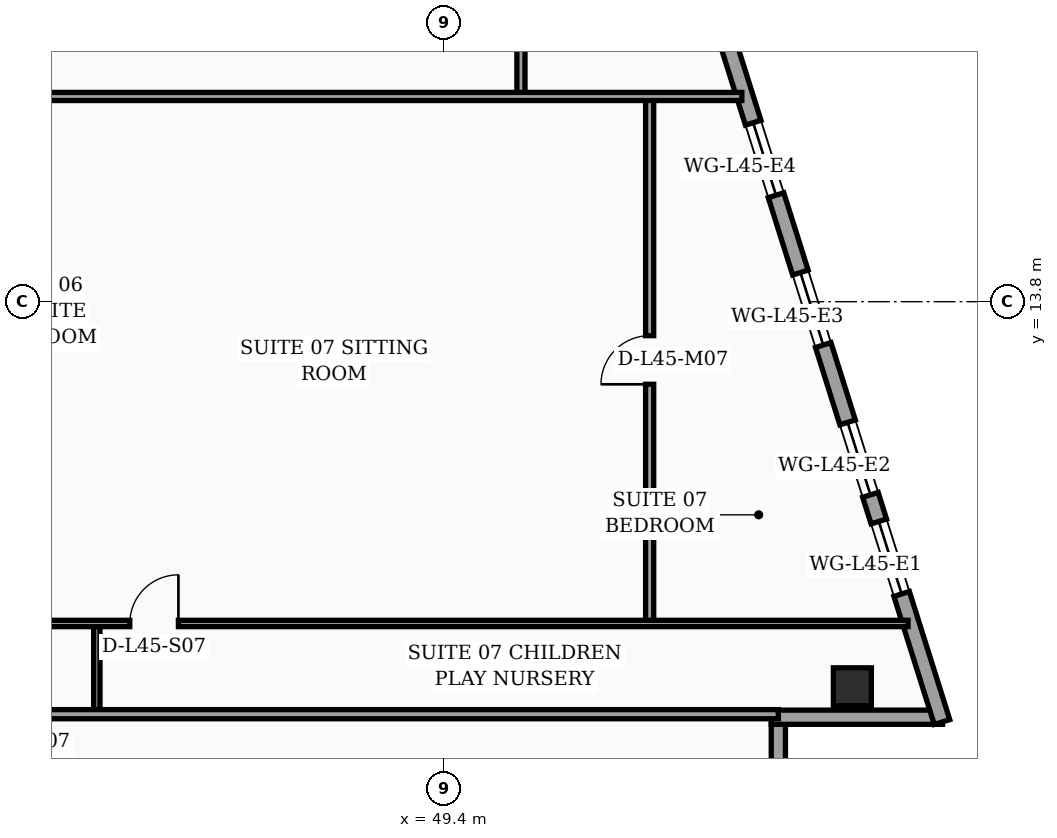
"""IFC4 building model, lengths in metres.
Left out: names, types, materials, properties, quantities, classifications, styles, units other than length and angle.
Written with IfcOpenShell. Run it as: python <this file> out.ifc"""

import sys

from ifc_helpers import new_model, si_unit, direction, frame, frame_2d, origin, origin_2d, place, context, subcontext, project, spatial, rectangle, hollow_rectangle, extrude, element, fill, save


model = new_model("IFC4")
c1 = context("Model", 3, precision=1e-05, world=origin(), true_north=direction((0.0, 1.0)))
c2 = subcontext(c1, "Body", "Model", "MODEL_VIEW")
j1 = project(units=[si_unit("LENGTHUNIT", "METRE"), si_unit("PLANEANGLEUNIT", "RADIAN")], contexts=[c1])
p1 = place(None, origin())
s1 = spatial("IfcSite", under=j1, at=p1, CompositionType="ELEMENT")
p2 = place(p1, origin())
s2 = spatial("IfcBuilding", under=s1, at=p2, CompositionType="ELEMENT")
p3 = place(p2, frame((0.0, 0.0, 182.7)))
s3 = spatial("IfcBuildingStorey", under=s2, at=p3, CompositionType="ELEMENT", Elevation=182.7)
p4 = place(p3, frame((57.461, 6.2, 0.0), z_axis=(0.0, 0.0, 1.0), x_axis=(1.0, 0.0, 0.0)))
e1 = element("IfcColumn", 1, at=p4, inside=s3, PredefinedType="COLUMN", context=c2, shape_type="SweptSolid", body=[
    extrude(hollow_rectangle(XDim=0.75, YDim=0.75, WallThickness=0.032, at=origin_2d()), origin(), (0.0, 0.0, 1.0), 3.52),
])
p5 = place(p3, frame((56.0, 2.52, 0.0), z_axis=(0.0, 0.0, 1.0), x_axis=(0.0, 1.0, 0.0)))
e2 = element("IfcWall", 2, at=p5, inside=s3, PredefinedType="SOLIDWALL", context=c2, shape_type="SweptSolid", body=[
    extrude(rectangle(XDim=2.94, YDim=0.28, at=frame_2d((1.47, 0.0))), origin(), (0.0, 0.0, 1.0), 3.02),
])
p6 = place(p3, frame((55.86, 5.6, 0.0), z_axis=(0.0, 0.0, 1.0), x_axis=(1.0, 0.0, 0.0)))
e3 = element("IfcWall", 3, at=p6, inside=s3, PredefinedType="SOLIDWALL", context=c2, shape_type="SweptSolid", body=[
    extrude(rectangle(XDim=3.38, YDim=0.28, at=frame_2d((1.69, 0.0))), origin(), (0.0, 0.0, 1.0), 3.02),
])
p7 = place(p3, frame((59.23, 5.505, 0.0), z_axis=(0.0, 0.0, 1.0), x_axis=(-0.300509063924, 0.953778958931, 0.0)))
e4 = element("IfcWall", 4, at=p7, inside=s3, PredefinedType="SOLIDWALL", context=c2, shape_type="SweptSolid", body=[
    extrude(rectangle(XDim=30.814, YDim=0.32, at=frame_2d((15.407, 0.0))), origin(), (0.0, 0.0, 1.0), 3.52),
])
p8 = place(p7, frame((18.796, 0.0, 0.0)))
e5 = element("IfcOpeningElement", 5, at=p8, cuts=e4, PredefinedType="OPENING", context=c2, shape_type="SweptSolid", body=[
    extrude(rectangle(XDim=1.4, YDim=2.25, at=frame_2d((0.7, 1.125))), frame((0.0, 0.17, 0.0), z_axis=(0.0, -1.0, 0.0), x_axis=(1.0, 0.0, 0.0)), (0.0, 0.0, 1.0), 0.34),
])
p9 = place(p7, frame((2.65, 0.0, 0.75)))
e6 = element("IfcOpeningElement", 6, at=p9, cuts=e4, PredefinedType="OPENING", context=c2, shape_type="SweptSolid", body=[
    extrude(rectangle(XDim=1.5, YDim=1.6, at=frame_2d((0.75, 0.8))), frame((0.0, 0.17, 0.0), z_axis=(0.0, -1.0, 0.0), x_axis=(1.0, 0.0, 0.0)), (0.0, 0.0, 1.0), 0.34),
])
p10 = place(p7, frame((4.7, 0.0, 0.75)))
e7 = element("IfcOpeningElement", 7, at=p10, cuts=e4, PredefinedType="OPENING", context=c2, shape_type="SweptSolid", body=[
    extrude(rectangle(XDim=1.5, YDim=1.6, at=frame_2d((0.75, 0.8))), frame((0.0, 0.17, 0.0), z_axis=(0.0, -1.0, 0.0), x_axis=(1.0, 0.0, 0.0)), (0.0, 0.0, 1.0), 0.34),
])
p11 = place(p7, frame((7.8, 0.0, 0.75)))
e8 = element("IfcOpeningElement", 8, at=p11, cuts=e4, PredefinedType="OPENING", context=c2, shape_type="SweptSolid", body=[
    extrude(rectangle(XDim=1.5, YDim=1.6, at=frame_2d((0.75, 0.8))), frame((0.0, 0.17, 0.0), z_axis=(0.0, -1.0, 0.0), x_axis=(1.0, 0.0, 0.0)), (0.0, 0.0, 1.0), 0.34),
])
p12 = place(p7, frame((10.9, 0.0, 0.75)))
e9 = element("IfcOpeningElement", 9, at=p12, cuts=e4, PredefinedType="OPENING", context=c2, shape_type="SweptSolid", body=[
    extrude(rectangle(XDim=1.5, YDim=1.6, at=frame_2d((0.75, 0.8))), frame((0.0, 0.17, 0.0), z_axis=(0.0, -1.0, 0.0), x_axis=(1.0, 0.0, 0.0)), (0.0, 0.0, 1.0), 0.34),
])
p13 = place(p7, frame((14.0, 0.0, 0.75)))
e10 = element("IfcOpeningElement", 10, at=p13, cuts=e4, PredefinedType="OPENING", context=c2, shape_type="SweptSolid", body=[
    extrude(rectangle(XDim=1.5, YDim=1.6, at=frame_2d((0.75, 0.8))), frame((0.0, 0.17, 0.0), z_axis=(0.0, -1.0, 0.0), x_axis=(1.0, 0.0, 0.0)), (0.0, 0.0, 1.0), 0.34),
])
p14 = place(p7, frame((16.55, 0.0, 0.75)))
e11 = element("IfcOpeningElement", 11, at=p14, cuts=e4, PredefinedType="OPENING", context=c2, shape_type="SweptSolid", body=[
    extrude(rectangle(XDim=1.5, YDim=1.6, at=frame_2d((0.75, 0.8))), frame((0.0, 0.17, 0.0), z_axis=(0.0, -1.0, 0.0), x_axis=(1.0, 0.0, 0.0)), (0.0, 0.0, 1.0), 0.34),
])
p15 = place(p7, frame((23.3, 0.0, 0.75)))
e12 = element("IfcOpeningElement", 12, at=p15, cuts=e4, PredefinedType="OPENING", context=c2, shape_type="SweptSolid", body=[
    extrude(rectangle(XDim=1.5, YDim=1.6, at=frame_2d((0.75, 0.8))), frame((0.0, 0.17, 0.0), z_axis=(0.0, -1.0, 0.0), x_axis=(1.0, 0.0, 0.0)), (0.0, 0.0, 1.0), 0.34),
])
p16 = place(p7, frame((27.45, 0.0, 0.75)))
e13 = element("IfcOpeningElement", 13, at=p16, cuts=e4, PredefinedType="OPENING", context=c2, shape_type="SweptSolid", body=[
    extrude(rectangle(XDim=1.5, YDim=1.6, at=frame_2d((0.75, 0.8))), frame((0.0, 0.17, 0.0), z_axis=(0.0, -1.0, 0.0), x_axis=(1.0, 0.0, 0.0)), (0.0, 0.0, 1.0), 0.34),
])
p17 = place(p3, frame((42.55, 5.66, 0.0), z_axis=(0.0, 0.0, 1.0), x_axis=(0.0, 1.0, 0.0)))
e14 = element("IfcWall", 14, at=p17, inside=s3, PredefinedType="PARTITIONING", context=c2, shape_type="SweptSolid", body=[
    extrude(rectangle(XDim=1.79, YDim=0.125, at=frame_2d((0.895, 0.0))), origin(), (0.0, 0.0, 1.0), 3.52),
])
p18 = place(p3, frame((53.46, 7.45, 0.0), z_axis=(0.0, 0.0, 1.0), x_axis=(0.0, 1.0, 0.0)))
e15 = element("IfcWall", 15, at=p18, inside=s3, PredefinedType="PARTITIONING", context=c2, shape_type="SweptSolid", body=[
    extrude(rectangle(XDim=10.4, YDim=0.16, at=frame_2d((5.2, 0.0))), origin(), (0.0, 0.0, 1.0), 3.02),
])
p19 = place(p18, frame((4.72, 0.0, 0.0)))
e16 = element("IfcOpeningElement", 16, at=p19, cuts=e15, PredefinedType="OPENING", context=c2, shape_type="SweptSolid", body=[
    extrude(rectangle(XDim=0.96, YDim=2.2, at=frame_2d((0.48, 1.1))), frame((0.0, 0.09, 0.0), z_axis=(0.0, -1.0, 0.0), x_axis=(1.0, 0.0, 0.0)), (0.0, 0.0, 1.0), 0.18),
])
p20 = place(p3, frame((39.6, 7.45, 0.0), z_axis=(0.0, 0.0, 1.0), x_axis=(1.0, 0.0, 0.0)))
e17 = element("IfcWall", 17, at=p20, inside=s3, PredefinedType="PARTITIONING", context=c2, shape_type="SweptSolid", body=[
    extrude(rectangle(XDim=18.96, YDim=0.125, at=frame_2d((9.48, 0.0))), origin(), (0.0, 0.0, 1.0), 2.92),
])
p21 = place(p20, frame((0.5, 0.0, 0.0)))
e18 = element("IfcOpeningElement", 18, at=p21, cuts=e17, PredefinedType="OPENING", context=c2, shape_type="SweptSolid", body=[
    extrude(rectangle(XDim=0.9, YDim=2.15, at=frame_2d((0.45, 1.075))), frame((0.0, 0.073, 0.0), z_axis=(0.0, -1.0, 0.0), x_axis=(1.0, 0.0, 0.0)), (0.0, 0.0, 1.0), 0.145),
])
p22 = place(p20, frame((3.6, 0.0, 0.0)))
e19 = element("IfcOpeningElement", 19, at=p22, cuts=e17, PredefinedType="OPENING", context=c2, shape_type="SweptSolid", body=[
    extrude(rectangle(XDim=0.96, YDim=2.2, at=frame_2d((0.48, 1.1))), frame((0.0, 0.073, 0.0), z_axis=(0.0, -1.0, 0.0), x_axis=(1.0, 0.0, 0.0)), (0.0, 0.0, 1.0), 0.145),
])
p23 = place(p3, frame((39.6, 5.66, 0.0), z_axis=(0.0, 0.0, 1.0), x_axis=(1.0, 0.0, 0.0)))
e20 = element("IfcWall", 20, at=p23, inside=s3, PredefinedType="PARTITIONING", context=c2, shape_type="SweptSolid", body=[
    extrude(rectangle(XDim=16.4, YDim=0.18, at=frame_2d((8.2, 0.0))), origin(), (0.0, 0.0, 1.0), 2.92),
])
p24 = place(p3, frame((50.92, 17.85, 0.0), z_axis=(0.0, 0.0, 1.0), x_axis=(0.0, 1.0, 0.0)))
e21 = element("IfcWall", 21, at=p24, inside=s3, PredefinedType="PARTITIONING", context=c2, shape_type="SweptSolid", body=[
    extrude(rectangle(XDim=5.74, YDim=0.16, at=frame_2d((2.87, 0.0))), origin(), (0.0, 0.0, 1.0), 2.92),
])
p25 = place(p24, frame((2.39, 0.0, 0.0)))
e22 = element("IfcOpeningElement", 22, at=p25, cuts=e21, PredefinedType="OPENING", context=c2, shape_type="SweptSolid", body=[
    extrude(rectangle(XDim=0.96, YDim=2.2, at=frame_2d((0.48, 1.1))), frame((0.0, 0.09, 0.0), z_axis=(0.0, -1.0, 0.0), x_axis=(1.0, 0.0, 0.0)), (0.0, 0.0, 1.0), 0.18),
])
p26 = place(p3, frame((39.6, 17.85, 0.0), z_axis=(0.0, 0.0, 1.0), x_axis=(1.0, 0.0, 0.0)))
e23 = element("IfcWall", 23, at=p26, inside=s3, PredefinedType="PARTITIONING", context=c2, shape_type="SweptSolid", body=[
    extrude(rectangle(XDim=15.68, YDim=0.16, at=frame_2d((7.84, 0.0))), origin(), (0.0, 0.0, 1.0), 2.92),
])
p27 = place(p9, origin())
e24 = element("IfcWindow", 24, at=p27, inside=s3, PartitioningType="SINGLE_PANEL", PredefinedType="WINDOW", context=c2, shape_type="SweptSolid", body=[
    extrude(rectangle(XDim=1.5, YDim=1.6, at=frame_2d((0.75, 0.8))), frame((0.0, 0.03, 0.0), z_axis=(0.0, -1.0, 0.0), x_axis=(1.0, 0.0, 0.0)), (0.0, 0.0, 1.0), 0.06),
])
fill(e6, e24)
p28 = place(p10, origin())
e25 = element("IfcWindow", 25, at=p28, inside=s3, PartitioningType="SINGLE_PANEL", PredefinedType="WINDOW", context=c2, shape_type="SweptSolid", body=[
    extrude(rectangle(XDim=1.5, YDim=1.6, at=frame_2d((0.75, 0.8))), frame((0.0, 0.03, 0.0), z_axis=(0.0, -1.0, 0.0), x_axis=(1.0, 0.0, 0.0)), (0.0, 0.0, 1.0), 0.06),
])
fill(e7, e25)
p29 = place(p11, origin())
e26 = element("IfcWindow", 26, at=p29, inside=s3, PartitioningType="SINGLE_PANEL", PredefinedType="WINDOW", context=c2, shape_type="SweptSolid", body=[
    extrude(rectangle(XDim=1.5, YDim=1.6, at=frame_2d((0.75, 0.8))), frame((0.0, 0.03, 0.0), z_axis=(0.0, -1.0, 0.0), x_axis=(1.0, 0.0, 0.0)), (0.0, 0.0, 1.0), 0.06),
])
fill(e8, e26)
p30 = place(p12, origin())
e27 = element("IfcWindow", 27, at=p30, inside=s3, PartitioningType="SINGLE_PANEL", PredefinedType="WINDOW", context=c2, shape_type="SweptSolid", body=[
    extrude(rectangle(XDim=1.5, YDim=1.6, at=frame_2d((0.75, 0.8))), frame((0.0, 0.03, 0.0), z_axis=(0.0, -1.0, 0.0), x_axis=(1.0, 0.0, 0.0)), (0.0, 0.0, 1.0), 0.06),
])
fill(e9, e27)
p31 = place(p19, origin())
e28 = element("IfcDoor", 28, at=p31, inside=s3, OperationType="SINGLE_SWING_LEFT", PredefinedType="DOOR", context=c2, shape_type="SweptSolid", body=[
    extrude(rectangle(XDim=0.96, YDim=2.2, at=frame_2d((0.48, 1.1))), frame((0.0, 0.025, 0.0), z_axis=(0.0, -1.0, 0.0), x_axis=(1.0, 0.0, 0.0)), (0.0, 0.0, 1.0), 0.05),
])
fill(e16, e28)
p32 = place(p22, origin())
e29 = element("IfcDoor", 29, at=p32, inside=s3, OperationType="SINGLE_SWING_RIGHT", PredefinedType="DOOR", context=c2, shape_type="SweptSolid", body=[
    extrude(rectangle(XDim=0.96, YDim=2.2, at=frame_2d((0.48, 1.1))), frame((0.0, 0.025, 0.0), z_axis=(0.0, -1.0, 0.0), x_axis=(1.0, 0.0, 0.0)), (0.0, 0.0, 1.0), 0.05),
])
fill(e19, e29)
save(model, sys.argv[1])
